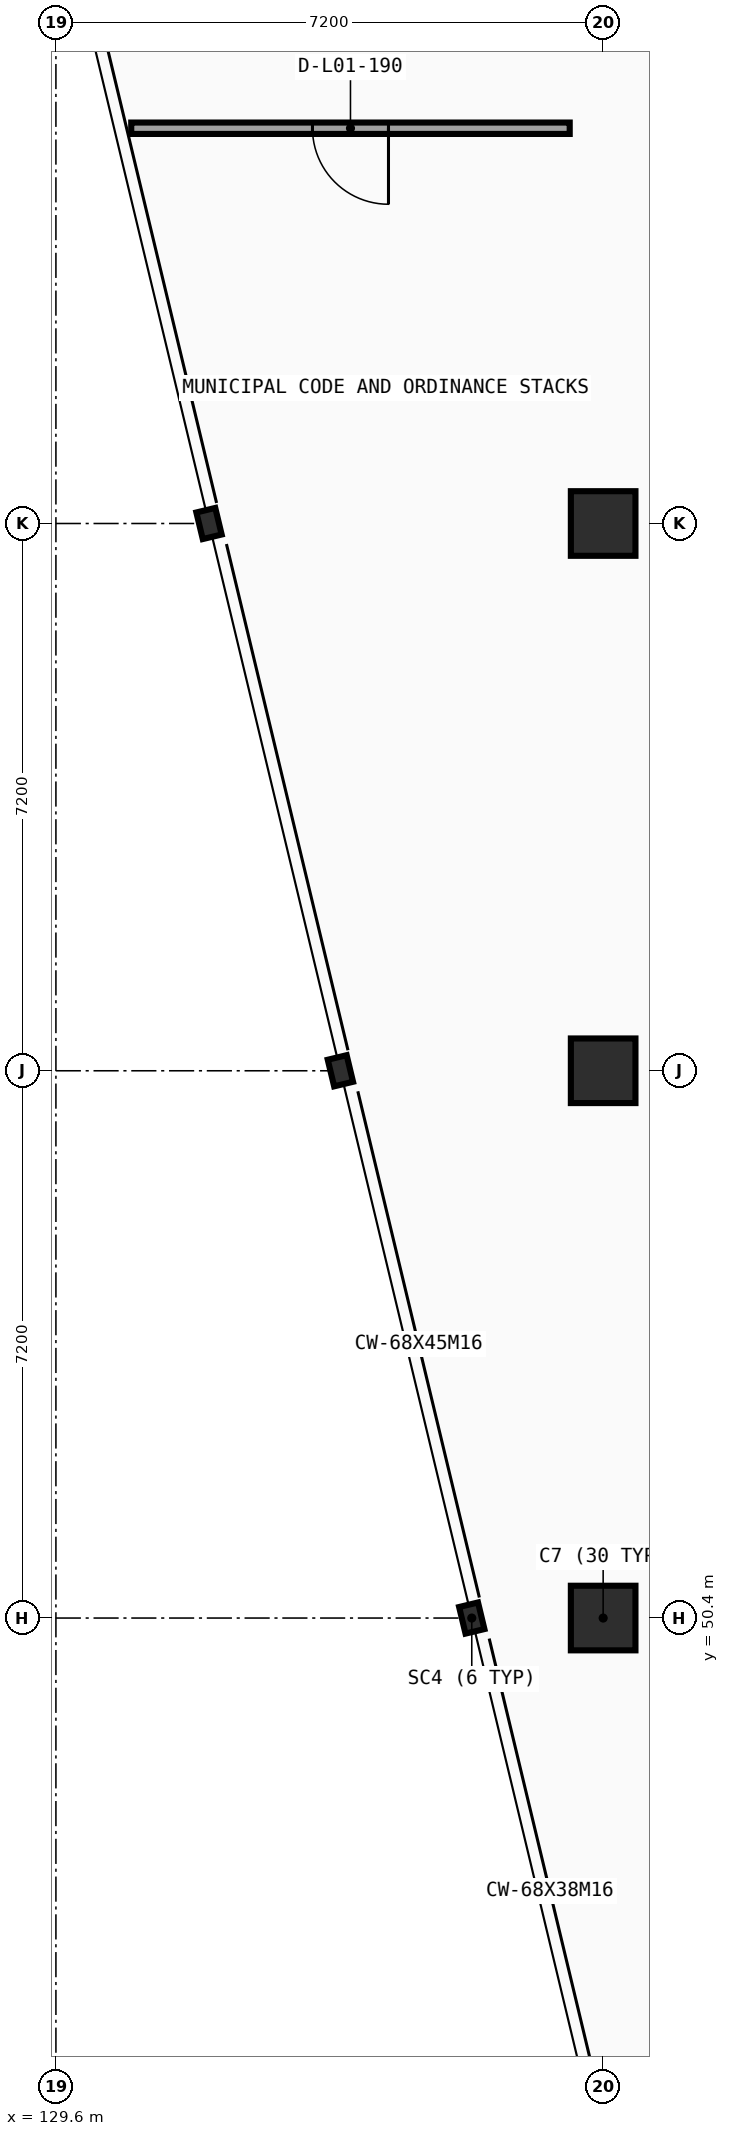
"""IFC4 building model, lengths in metres.
Left out: names, types, materials, properties, quantities, classifications, styles, units other than length and angle.
Written with IfcOpenShell. Run it as: python <this file> out.ifc"""

import sys

from ifc_helpers import new_model, si_unit, direction, frame, frame_2d, origin, origin_2d, place, context, subcontext, project, spatial, rectangle, circle, i_section, extrude, element, fill, save


model = new_model("IFC4")
c1 = context("Model", 3, precision=1e-05, world=origin(), true_north=direction((0.0, 1.0)))
c2 = subcontext(c1, "Body", "Model", "MODEL_VIEW")
j1 = project(units=[si_unit("LENGTHUNIT", "METRE"), si_unit("PLANEANGLEUNIT", "RADIAN")], contexts=[c1])
p1 = place(None, origin())
s1 = spatial("IfcSite", under=j1, at=p1, CompositionType="ELEMENT")
p2 = place(p1, origin())
s2 = spatial("IfcBuilding", under=s1, at=p2, CompositionType="ELEMENT")
p3 = place(p2, frame((0.0, 0.0, 5.4)))
s3 = spatial("IfcBuildingStorey", under=s2, at=p3, CompositionType="ELEMENT", Elevation=5.4)
for number, where, z_axis, x_axis in (
    (1, (136.8, 50.4, 0.0), (0.0, 0.0, 1.0), (1.0, 0.0, 0.0)),
    (2, (136.8, 57.6, 0.0), (0.0, 0.0, 1.0), (1.0, 0.0, 0.0)),
    (3, (136.8, 64.8, 0.0), (0.0, 0.0, 1.0), (1.0, 0.0, 0.0)),
):
    element("IfcColumn", number, at=place(p3, frame(where, z_axis=z_axis, x_axis=x_axis)), inside=s3, PredefinedType="COLUMN", context=c2, shape_type="SweptSolid", body=[
        extrude(circle(Radius=0.425, at=origin_2d()), origin(), (0.0, 0.0, 1.0), 4.8),
    ])
for number, where, z_axis, x_axis in (
    (4, (135.071, 50.4, 0.0), (0.0, 0.0, 1.0), (0.972, 0.233, 0.0)),
    (5, (133.343, 57.6, 0.0), (0.0, 0.0, 1.0), (0.972, 0.233, 0.0)),
    (6, (131.614, 64.8, 0.0), (0.0, 0.0, 1.0), (0.972, 0.233, 0.0)),
):
    element("IfcColumn", number, at=place(p3, frame(where, z_axis=z_axis, x_axis=x_axis)), inside=s3, PredefinedType="COLUMN", context=c2, shape_type="SweptSolid", body=[
        extrude(i_section(OverallWidth=0.256, OverallDepth=0.36, WebThickness=0.011, FlangeThickness=0.02, FilletRadius=0.015, at=origin_2d()), origin(), (0.0, 0.0, 1.0), 4.8),
    ])
p4 = place(p3, frame((130.591, 70.0, 0.0), z_axis=(0.0, 0.0, 1.0), x_axis=(1.0, 0.0, 0.0)))
e7 = element("IfcWall", 7, at=p4, inside=s3, PredefinedType="PARTITIONING", context=c2, shape_type="SweptSolid", body=[
    extrude(rectangle(XDim=5.769, YDim=0.15, at=frame_2d((2.885, 0.0))), origin(), (0.0, 0.0, 1.0), 4.52),
])
p5 = place(p4, frame((2.385, 0.0, 0.0)))
e8 = element("IfcOpeningElement", 8, at=p5, cuts=e7, PredefinedType="OPENING", context=c2, shape_type="SweptSolid", body=[
    extrude(rectangle(XDim=1.0, YDim=2.1, at=frame_2d((0.5, 1.05))), frame((0.0, 0.085, 0.0), z_axis=(0.0, -1.0, 0.0), x_axis=(1.0, 0.0, 0.0)), (0.0, 0.0, 1.0), 0.17),
])
p6 = place(p5, origin())
e9 = element("IfcDoor", 9, at=p6, inside=s3, OperationType="SINGLE_SWING_RIGHT", PredefinedType="DOOR", context=c2, shape_type="SweptSolid", body=[
    extrude(rectangle(XDim=1.0, YDim=2.1, at=frame_2d((0.5, 1.05))), frame((0.0, 0.025, 0.0), z_axis=(0.0, -1.0, 0.0), x_axis=(1.0, 0.0, 0.0)), (0.0, 0.0, 1.0), 0.05),
])
fill(e8, e9)
save(model, sys.argv[1])
